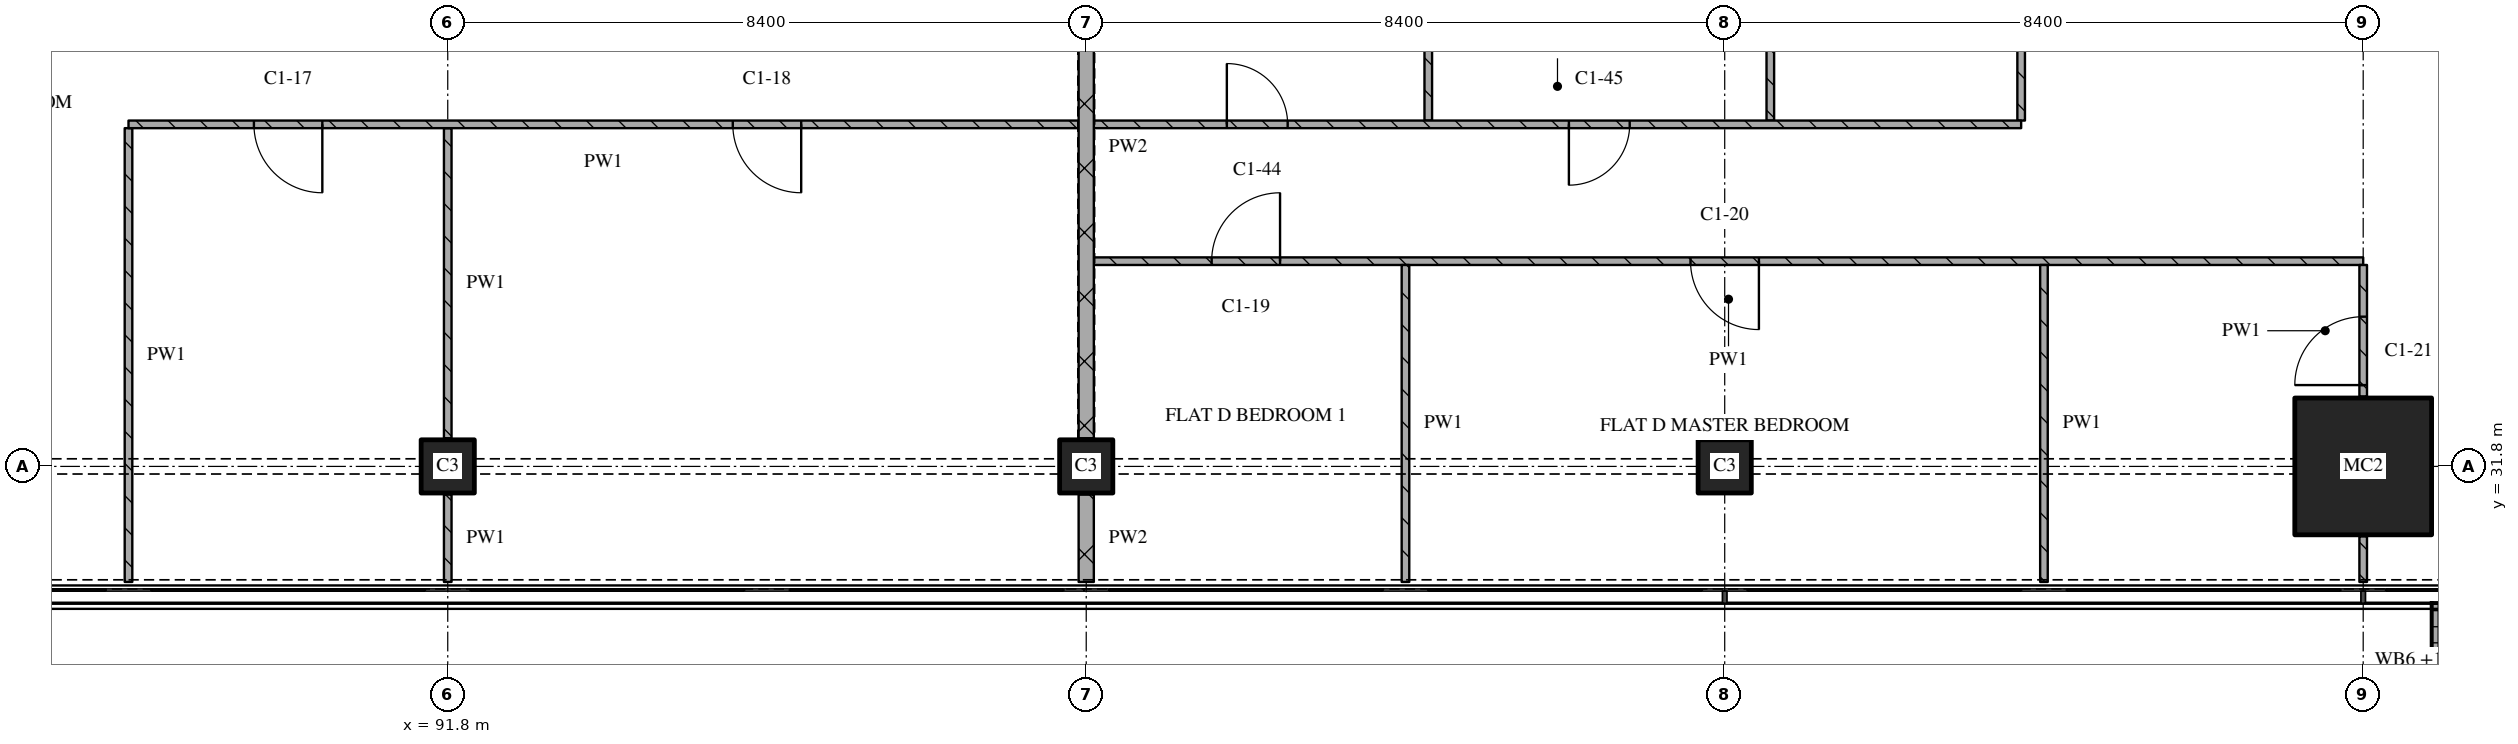
"""IFC4 building model, lengths in metres.
Left out: names, types, materials, properties, quantities, classifications, styles, units other than length and angle.
Written with IfcOpenShell. Run it as: python <this file> out.ifc"""

import sys

from ifc_helpers import new_model, si_unit, direction, frame, frame_2d, origin, origin_2d, place, context, subcontext, project, spatial, polyline, rectangle, outline, extrude, element, fill, save


model = new_model("IFC4")
c1 = context("Model", 3, precision=1e-05, world=origin(), true_north=direction((0.0, 1.0)))
c2 = subcontext(c1, "Body", "Model", "MODEL_VIEW")
j1 = project(units=[si_unit("LENGTHUNIT", "METRE"), si_unit("PLANEANGLEUNIT", "RADIAN")], contexts=[c1])
p1 = place(None, origin())
s1 = spatial("IfcSite", under=j1, at=p1, CompositionType="ELEMENT")
p2 = place(p1, origin())
s2 = spatial("IfcBuilding", under=s1, at=p2, CompositionType="ELEMENT")
p3 = place(p2, frame((0.0, 0.0, 154.65)))
s3 = spatial("IfcBuildingStorey", under=s2, at=p3, CompositionType="ELEMENT", Elevation=154.65)
for number, where, z_axis, x_axis in (
    (1, (91.8, 31.8, 0.0), (0.0, 0.0, 1.0), (1.0, 0.0, 0.0)),
    (2, (100.2, 31.8, 0.0), (0.0, 0.0, 1.0), (1.0, 0.0, 0.0)),
    (3, (108.6, 31.8, 0.0), (0.0, 0.0, 1.0), (1.0, 0.0, 0.0)),
):
    element("IfcColumn", number, at=place(p3, frame(where, z_axis=z_axis, x_axis=x_axis)), inside=s3, PredefinedType="COLUMN", context=c2, shape_type="SweptSolid", body=[
        extrude(rectangle(XDim=0.7, YDim=0.7, at=origin_2d()), origin(), (0.0, 0.0, 1.0), 3.6),
    ])
p4 = place(p3, frame((117.0, 31.8, 0.0), z_axis=(0.0, 0.0, 1.0), x_axis=(1.0, 0.0, 0.0)))
e4 = element("IfcColumn", 4, at=p4, inside=s3, PredefinedType="COLUMN", context=c2, shape_type="SweptSolid", body=[
    extrude(rectangle(XDim=1.8, YDim=1.8, at=origin_2d()), origin(), (0.0, 0.0, 1.0), 3.6),
])
p5 = place(p3, origin())
e5 = element("IfcWall", 5, at=p5, inside=s3, PredefinedType="SOLIDWALL", context=c2, shape_type="SweptSolid", body=[
    extrude(outline(polyline([(117.9, 30.0), (118.0, 30.0), (118.0, 28.5), (120.2, 28.5), (120.2, 30.0), (120.3, 30.0), (120.3, 28.4), (117.9, 28.4), (117.9, 30.0)])), origin(), (0.0, 0.0, 1.0), 1.0),
])
p6 = place(p3, frame((117.0, 34.5, 0.0), z_axis=(0.0, 0.0, 1.0), x_axis=(-1.0, 0.0, 0.0)))
e6 = element("IfcWall", 6, at=p6, inside=s3, PredefinedType="PARTITIONING", context=c2, shape_type="SweptSolid", body=[
    extrude(rectangle(XDim=16.7, YDim=0.1, at=frame_2d((8.35, 0.0))), origin(), (0.0, 0.0, 1.0), 3.32),
])
p7 = place(p6, frame((7.95, 0.0, 0.0)))
e7 = element("IfcOpeningElement", 7, at=p7, cuts=e6, PredefinedType="OPENING", context=c2, shape_type="SweptSolid", body=[
    extrude(rectangle(XDim=0.9, YDim=2.1, at=frame_2d((0.45, 1.05))), frame((0.0, 0.06, 0.0), z_axis=(0.0, -1.0, 0.0), x_axis=(1.0, 0.0, 0.0)), (0.0, 0.0, 1.0), 0.12),
])
p8 = place(p6, frame((14.25, 0.0, 0.0)))
e8 = element("IfcOpeningElement", 8, at=p8, cuts=e6, PredefinedType="OPENING", context=c2, shape_type="SweptSolid", body=[
    extrude(rectangle(XDim=0.9, YDim=2.1, at=frame_2d((0.45, 1.05))), frame((0.0, 0.06, 0.0), z_axis=(0.0, -1.0, 0.0), x_axis=(1.0, 0.0, 0.0)), (0.0, 0.0, 1.0), 0.12),
])
p9 = place(p3, frame((87.6, 36.25, 0.0), z_axis=(0.0, 0.0, 1.0), x_axis=(0.0, -1.0, 0.0)))
e9 = element("IfcWall", 9, at=p9, inside=s3, PredefinedType="PARTITIONING", context=c2, shape_type="SweptSolid", body=[
    extrude(rectangle(XDim=5.97, YDim=0.1, at=frame_2d((2.985, 0.0))), origin(), (0.0, 0.0, 1.0), 3.32),
])
p10 = place(p3, frame((91.8, 31.43, 0.0), z_axis=(0.0, 0.0, 1.0), x_axis=(0.0, -1.0, 0.0)))
e10 = element("IfcWall", 10, at=p10, inside=s3, PredefinedType="PARTITIONING", context=c2, shape_type="SweptSolid", body=[
    extrude(rectangle(XDim=1.15, YDim=0.1, at=frame_2d((0.575, 0.0))), origin(), (0.0, 0.0, 1.0), 3.32),
])
p11 = place(p3, frame((91.8, 36.25, 0.0), z_axis=(0.0, 0.0, 1.0), x_axis=(0.0, -1.0, 0.0)))
e11 = element("IfcWall", 11, at=p11, inside=s3, PredefinedType="PARTITIONING", context=c2, shape_type="SweptSolid", body=[
    extrude(rectangle(XDim=4.08, YDim=0.1, at=frame_2d((2.04, 0.0))), origin(), (0.0, 0.0, 1.0), 3.32),
])
p12 = place(p3, frame((100.2, 31.43, 0.0), z_axis=(0.0, 0.0, 1.0), x_axis=(0.0, -1.0, 0.0)))
e12 = element("IfcWall", 12, at=p12, inside=s3, PredefinedType="PARTITIONING", context=c2, shape_type="SweptSolid", body=[
    extrude(rectangle(XDim=1.15, YDim=0.2, at=frame_2d((0.575, 0.0))), origin(), (0.0, 0.0, 1.0), 3.32),
])
p13 = place(p3, frame((100.2, 39.83, 0.0), z_axis=(0.0, 0.0, 1.0), x_axis=(0.0, -1.0, 0.0)))
e13 = element("IfcWall", 13, at=p13, inside=s3, PredefinedType="PARTITIONING", context=c2, shape_type="SweptSolid", body=[
    extrude(rectangle(XDim=7.66, YDim=0.2, at=frame_2d((3.83, 0.0))), origin(), (0.0, 0.0, 1.0), 2.72),
])
p14 = place(p3, frame((104.4, 34.45, 0.0), z_axis=(0.0, 0.0, 1.0), x_axis=(0.0, -1.0, 0.0)))
e14 = element("IfcWall", 14, at=p14, inside=s3, PredefinedType="PARTITIONING", context=c2, shape_type="SweptSolid", body=[
    extrude(rectangle(XDim=4.17, YDim=0.1, at=frame_2d((2.085, 0.0))), origin(), (0.0, 0.0, 1.0), 3.32),
])
for number, where, z_axis, x_axis in (
    (15, (104.7, 40.7, 0.0), (0.0, 0.0, 1.0), (0.0, -1.0, 0.0)),
    (16, (109.2, 40.7, 0.0), (0.0, 0.0, 1.0), (0.0, -1.0, 0.0)),
):
    element("IfcWall", number, at=place(p3, frame(where, z_axis=z_axis, x_axis=x_axis)), inside=s3, PredefinedType="PARTITIONING", context=c2, shape_type="SweptSolid", body=[
        extrude(rectangle(XDim=4.35, YDim=0.1, at=frame_2d((2.175, 0.0))), origin(), (0.0, 0.0, 1.0), 3.32),
    ])
p15 = place(p3, frame((112.5, 36.35, 0.0), z_axis=(0.0, 0.0, 1.0), x_axis=(0.0, 1.0, 0.0)))
e17 = element("IfcWall", 17, at=p15, inside=s3, PredefinedType="PARTITIONING", context=c2, shape_type="SweptSolid", body=[
    extrude(rectangle(XDim=4.35, YDim=0.1, at=frame_2d((2.175, 0.0))), origin(), (0.0, 0.0, 1.0), 3.32),
])
p16 = place(p15, frame((1.75, 0.0, 0.0)))
e18 = element("IfcOpeningElement", 18, at=p16, cuts=e17, PredefinedType="OPENING", context=c2, shape_type="SweptSolid", body=[
    extrude(rectangle(XDim=0.9, YDim=2.1, at=frame_2d((0.45, 1.05))), frame((0.0, 0.06, 0.0), z_axis=(0.0, -1.0, 0.0), x_axis=(1.0, 0.0, 0.0)), (0.0, 0.0, 1.0), 0.12),
])
p17 = place(p3, frame((112.8, 34.45, 0.0), z_axis=(0.0, 0.0, 1.0), x_axis=(0.0, -1.0, 0.0)))
e19 = element("IfcWall", 19, at=p17, inside=s3, PredefinedType="PARTITIONING", context=c2, shape_type="SweptSolid", body=[
    extrude(rectangle(XDim=4.17, YDim=0.1, at=frame_2d((2.085, 0.0))), origin(), (0.0, 0.0, 1.0), 3.32),
])
p18 = place(p3, frame((117.0, 30.88, 0.0), z_axis=(0.0, 0.0, 1.0), x_axis=(0.0, -1.0, 0.0)))
e20 = element("IfcWall", 20, at=p18, inside=s3, PredefinedType="PARTITIONING", context=c2, shape_type="SweptSolid", body=[
    extrude(rectangle(XDim=0.6, YDim=0.1, at=frame_2d((0.3, 0.0))), origin(), (0.0, 0.0, 1.0), 3.32),
])
p19 = place(p3, frame((117.0, 32.72, 0.0), z_axis=(0.0, 0.0, 1.0), x_axis=(0.0, 1.0, 0.0)))
e21 = element("IfcWall", 21, at=p19, inside=s3, PredefinedType="PARTITIONING", context=c2, shape_type="SweptSolid", body=[
    extrude(rectangle(XDim=1.73, YDim=0.1, at=frame_2d((0.865, 0.0))), origin(), (0.0, 0.0, 1.0), 3.32),
])
p20 = place(p19, frame((0.15, 0.0, 0.0)))
e22 = element("IfcOpeningElement", 22, at=p20, cuts=e21, PredefinedType="OPENING", context=c2, shape_type="SweptSolid", body=[
    extrude(rectangle(XDim=0.9, YDim=2.1, at=frame_2d((0.45, 1.05))), frame((0.0, 0.06, 0.0), z_axis=(0.0, -1.0, 0.0), x_axis=(1.0, 0.0, 0.0)), (0.0, 0.0, 1.0), 0.12),
])
p21 = place(p3, frame((100.1, 36.3, 0.0), z_axis=(0.0, 0.0, 1.0), x_axis=(-1.0, 0.0, 0.0)))
e23 = element("IfcWall", 23, at=p21, inside=s3, PredefinedType="PARTITIONING", context=c2, shape_type="SweptSolid", body=[
    extrude(rectangle(XDim=12.5, YDim=0.1, at=frame_2d((6.25, 0.0))), origin(), (0.0, 0.0, 1.0), 3.32),
])
p22 = place(p21, frame((3.65, 0.0, 0.0)))
e24 = element("IfcOpeningElement", 24, at=p22, cuts=e23, PredefinedType="OPENING", context=c2, shape_type="SweptSolid", body=[
    extrude(rectangle(XDim=0.9, YDim=2.1, at=frame_2d((0.45, 1.05))), frame((0.0, 0.06, 0.0), z_axis=(0.0, -1.0, 0.0), x_axis=(1.0, 0.0, 0.0)), (0.0, 0.0, 1.0), 0.12),
])
p23 = place(p21, frame((9.95, 0.0, 0.0)))
e25 = element("IfcOpeningElement", 25, at=p23, cuts=e23, PredefinedType="OPENING", context=c2, shape_type="SweptSolid", body=[
    extrude(rectangle(XDim=0.9, YDim=2.1, at=frame_2d((0.45, 1.05))), frame((0.0, 0.06, 0.0), z_axis=(0.0, -1.0, 0.0), x_axis=(1.0, 0.0, 0.0)), (0.0, 0.0, 1.0), 0.12),
])
p24 = place(p3, frame((100.3, 36.3, 0.0), z_axis=(0.0, 0.0, 1.0), x_axis=(1.0, 0.0, 0.0)))
e26 = element("IfcWall", 26, at=p24, inside=s3, PredefinedType="PARTITIONING", context=c2, shape_type="SweptSolid", body=[
    extrude(rectangle(XDim=12.2, YDim=0.1, at=frame_2d((6.1, 0.0))), origin(), (0.0, 0.0, 1.0), 3.32),
])
p25 = place(p24, frame((1.75, 0.0, 0.0)))
e27 = element("IfcOpeningElement", 27, at=p25, cuts=e26, PredefinedType="OPENING", context=c2, shape_type="SweptSolid", body=[
    extrude(rectangle(XDim=0.8, YDim=2.1, at=frame_2d((0.4, 1.05))), frame((0.0, 0.06, 0.0), z_axis=(0.0, -1.0, 0.0), x_axis=(1.0, 0.0, 0.0)), (0.0, 0.0, 1.0), 0.12),
])
p26 = place(p24, frame((6.25, 0.0, 0.0)))
e28 = element("IfcOpeningElement", 28, at=p26, cuts=e26, PredefinedType="OPENING", context=c2, shape_type="SweptSolid", body=[
    extrude(rectangle(XDim=0.8, YDim=2.1, at=frame_2d((0.4, 1.05))), frame((0.0, 0.06, 0.0), z_axis=(0.0, -1.0, 0.0), x_axis=(1.0, 0.0, 0.0)), (0.0, 0.0, 1.0), 0.12),
])
p27 = place(p7, origin())
e29 = element("IfcDoor", 29, at=p27, inside=s3, OperationType="SINGLE_SWING_LEFT", PredefinedType="DOOR", context=c2, shape_type="SweptSolid", body=[
    extrude(rectangle(XDim=0.9, YDim=2.1, at=frame_2d((0.45, 1.05))), frame((0.0, 0.025, 0.0), z_axis=(0.0, -1.0, 0.0), x_axis=(1.0, 0.0, 0.0)), (0.0, 0.0, 1.0), 0.05),
])
fill(e7, e29)
p28 = place(p8, origin())
e30 = element("IfcDoor", 30, at=p28, inside=s3, OperationType="SINGLE_SWING_RIGHT", PredefinedType="DOOR", context=c2, shape_type="SweptSolid", body=[
    extrude(rectangle(XDim=0.9, YDim=2.1, at=frame_2d((0.45, 1.05))), frame((0.0, 0.025, 0.0), z_axis=(0.0, -1.0, 0.0), x_axis=(1.0, 0.0, 0.0)), (0.0, 0.0, 1.0), 0.05),
])
fill(e8, e30)
p29 = place(p20, origin())
e31 = element("IfcDoor", 31, at=p29, inside=s3, OperationType="SINGLE_SWING_LEFT", PredefinedType="DOOR", context=c2, shape_type="SweptSolid", body=[
    extrude(rectangle(XDim=0.9, YDim=2.1, at=frame_2d((0.45, 1.05))), frame((0.0, 0.025, 0.0), z_axis=(0.0, -1.0, 0.0), x_axis=(1.0, 0.0, 0.0)), (0.0, 0.0, 1.0), 0.05),
])
fill(e22, e31)
p30 = place(p22, origin())
e32 = element("IfcDoor", 32, at=p30, inside=s3, OperationType="SINGLE_SWING_LEFT", PredefinedType="DOOR", context=c2, shape_type="SweptSolid", body=[
    extrude(rectangle(XDim=0.9, YDim=2.1, at=frame_2d((0.45, 1.05))), frame((0.0, 0.025, 0.0), z_axis=(0.0, -1.0, 0.0), x_axis=(1.0, 0.0, 0.0)), (0.0, 0.0, 1.0), 0.05),
])
fill(e24, e32)
p31 = place(p23, origin())
e33 = element("IfcDoor", 33, at=p31, inside=s3, OperationType="SINGLE_SWING_LEFT", PredefinedType="DOOR", context=c2, shape_type="SweptSolid", body=[
    extrude(rectangle(XDim=0.9, YDim=2.1, at=frame_2d((0.45, 1.05))), frame((0.0, 0.025, 0.0), z_axis=(0.0, -1.0, 0.0), x_axis=(1.0, 0.0, 0.0)), (0.0, 0.0, 1.0), 0.05),
])
fill(e25, e33)
p32 = place(p25, origin())
e34 = element("IfcDoor", 34, at=p32, inside=s3, OperationType="SINGLE_SWING_LEFT", PredefinedType="DOOR", context=c2, shape_type="SweptSolid", body=[
    extrude(rectangle(XDim=0.8, YDim=2.1, at=frame_2d((0.4, 1.05))), frame((0.0, 0.025, 0.0), z_axis=(0.0, -1.0, 0.0), x_axis=(1.0, 0.0, 0.0)), (0.0, 0.0, 1.0), 0.05),
])
fill(e27, e34)
p33 = place(p26, origin())
e35 = element("IfcDoor", 35, at=p33, inside=s3, OperationType="SINGLE_SWING_RIGHT", PredefinedType="DOOR", context=c2, shape_type="SweptSolid", body=[
    extrude(rectangle(XDim=0.8, YDim=2.1, at=frame_2d((0.4, 1.05))), frame((0.0, 0.025, 0.0), z_axis=(0.0, -1.0, 0.0), x_axis=(1.0, 0.0, 0.0)), (0.0, 0.0, 1.0), 0.05),
])
fill(e28, e35)
save(model, sys.argv[1])
